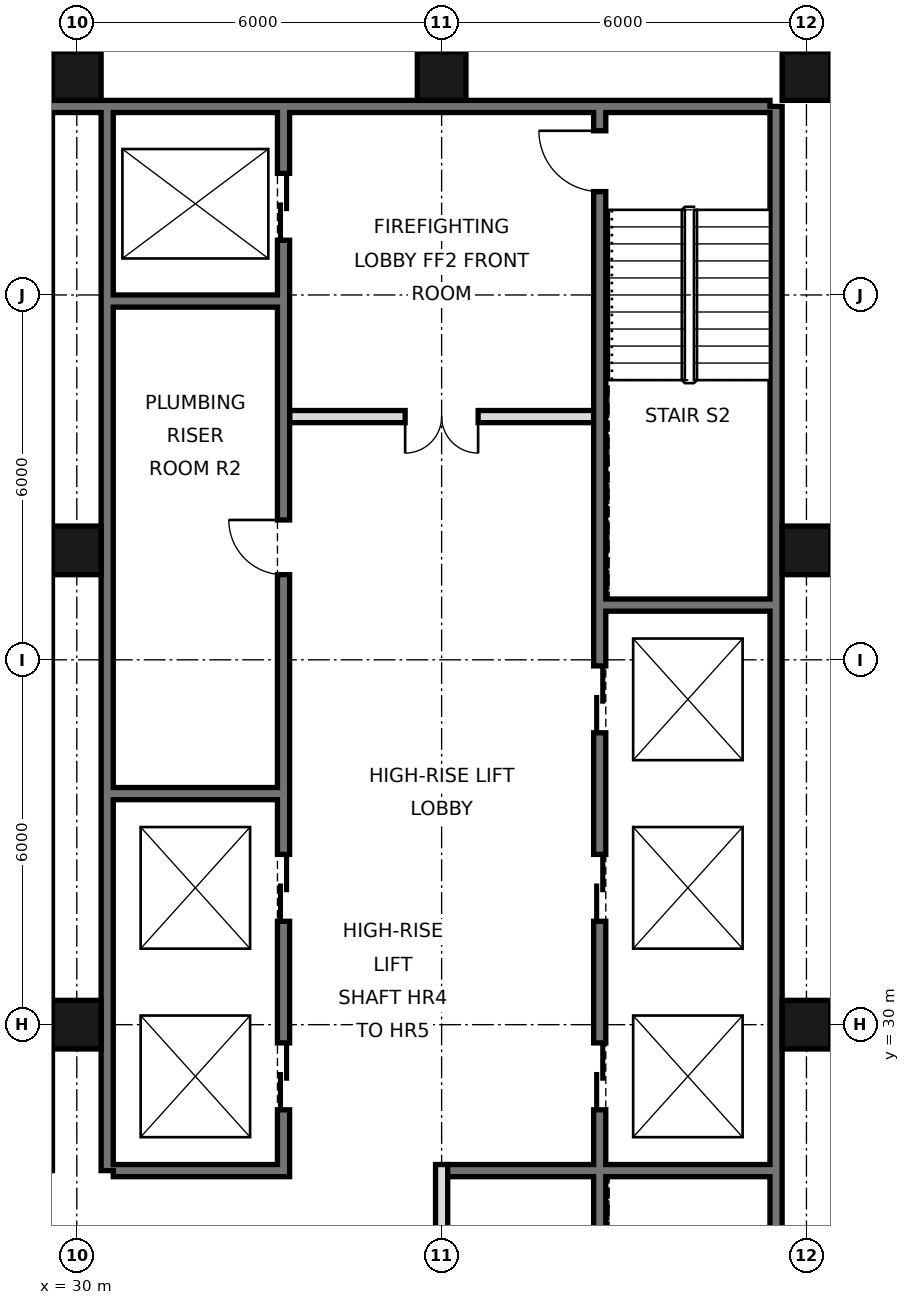
"""IFC4 building model, lengths in metres.
Left out: names, types, materials, properties, quantities, classifications, styles, units other than length and angle.
Written with IfcOpenShell. Run it as: python <this file> out.ifc"""

import sys

from ifc_helpers import new_model, si_unit, direction, frame, frame_2d, origin, origin_2d, place, context, subcontext, project, spatial, rectangle, hollow_rectangle, extrude, element, fill, save


model = new_model("IFC4")
c1 = context("Model", 3, precision=1e-05, world=origin(), true_north=direction((0.0, 1.0)))
c2 = subcontext(c1, "Body", "Model", "MODEL_VIEW")
j1 = project(units=[si_unit("LENGTHUNIT", "METRE"), si_unit("PLANEANGLEUNIT", "RADIAN")], contexts=[c1])
p1 = place(None, origin())
s1 = spatial("IfcSite", under=j1, at=p1, CompositionType="ELEMENT")
p2 = place(p1, origin())
s2 = spatial("IfcBuilding", under=s1, at=p2, CompositionType="ELEMENT")
p3 = place(p2, frame((0.0, 0.0, 316.0)))
s3 = spatial("IfcBuildingStorey", under=s2, at=p3, CompositionType="ELEMENT", Elevation=316.0)
for number, where, z_axis, x_axis in (
    (1, (30.0, 30.0, 0.0), (0.0, 0.0, 1.0), (1.0, 0.0, 0.0)),
    (2, (30.0, 37.8, 0.0), (0.0, 0.0, 1.0), (1.0, 0.0, 0.0)),
    (3, (30.0, 45.6, 0.0), (0.0, 0.0, 1.0), (1.0, 0.0, 0.0)),
    (4, (36.0, 45.6, 0.0), (0.0, 0.0, 1.0), (1.0, 0.0, 0.0)),
    (5, (42.0, 30.0, 0.0), (0.0, 0.0, 1.0), (1.0, 0.0, 0.0)),
    (6, (42.0, 37.8, 0.0), (0.0, 0.0, 1.0), (1.0, 0.0, 0.0)),
    (7, (42.0, 45.6, 0.0), (0.0, 0.0, 1.0), (1.0, 0.0, 0.0)),
):
    element("IfcColumn", number, at=place(p3, frame(where, z_axis=z_axis, x_axis=x_axis)), inside=s3, PredefinedType="COLUMN", context=c2, shape_type="SweptSolid", body=[
        extrude(hollow_rectangle(XDim=0.8, YDim=0.8, WallThickness=0.025, at=origin_2d()), origin(), (0.0, 0.0, 1.0), 3.6),
    ])
p4 = place(p3, frame((41.5, 21.6, 0.0), z_axis=(0.0, 0.0, 1.0), x_axis=(0.0, 1.0, 0.0)))
e8 = element("IfcWall", 8, at=p4, inside=s3, PredefinedType="SOLIDWALL", context=c2, shape_type="SweptSolid", body=[
    extrude(rectangle(XDim=23.5, YDim=0.2, at=frame_2d((11.75, 0.0))), origin(), (0.0, 0.0, 1.0), 3.42),
])
p5 = place(p3, frame((6.6, 45.1, 0.0), z_axis=(0.0, 0.0, 1.0), x_axis=(1.0, 0.0, 0.0)))
e9 = element("IfcWall", 9, at=p5, inside=s3, PredefinedType="SOLIDWALL", context=c2, shape_type="SweptSolid", body=[
    extrude(rectangle(XDim=34.8, YDim=0.2, at=frame_2d((17.4, 0.0))), origin(), (0.0, 0.0, 1.0), 3.42),
])
p6 = place(p3, frame((30.5, 27.6, 0.0), z_axis=(0.0, 0.0, 1.0), x_axis=(0.0, 1.0, 0.0)))
e10 = element("IfcWall", 10, at=p6, inside=s3, PredefinedType="SOLIDWALL", context=c2, shape_type="SweptSolid", body=[
    extrude(rectangle(XDim=17.5, YDim=0.2, at=frame_2d((8.75, 0.0))), origin(), (0.0, 0.0, 1.0), 3.42),
])
p7 = place(p3, frame((33.4, 27.5, 0.0), z_axis=(0.0, 0.0, 1.0), x_axis=(0.0, 1.0, 0.0)))
e11 = element("IfcWall", 11, at=p7, inside=s3, PredefinedType="SOLIDWALL", context=c2, shape_type="SweptSolid", body=[
    extrude(rectangle(XDim=17.5, YDim=0.2, at=frame_2d((8.75, 0.0))), origin(), (0.0, 0.0, 1.0), 3.42),
])
p8 = place(p7, frame((1.1, 0.0, 0.0)))
e12 = element("IfcOpeningElement", 12, at=p8, cuts=e11, PredefinedType="OPENING", context=c2, shape_type="SweptSolid", body=[
    extrude(rectangle(XDim=1.1, YDim=2.1, at=frame_2d((0.55, 1.05))), frame((0.0, 0.11, 0.0), z_axis=(0.0, -1.0, 0.0), x_axis=(1.0, 0.0, 0.0)), (0.0, 0.0, 1.0), 0.22),
])
p9 = place(p7, frame((4.2, 0.0, 0.0)))
e13 = element("IfcOpeningElement", 13, at=p9, cuts=e11, PredefinedType="OPENING", context=c2, shape_type="SweptSolid", body=[
    extrude(rectangle(XDim=1.1, YDim=2.1, at=frame_2d((0.55, 1.05))), frame((0.0, 0.11, 0.0), z_axis=(0.0, -1.0, 0.0), x_axis=(1.0, 0.0, 0.0)), (0.0, 0.0, 1.0), 0.22),
])
p10 = place(p7, frame((15.4, 0.0, 0.0)))
e14 = element("IfcOpeningElement", 14, at=p10, cuts=e11, PredefinedType="OPENING", context=c2, shape_type="SweptSolid", body=[
    extrude(rectangle(XDim=1.1, YDim=2.1, at=frame_2d((0.55, 1.05))), frame((0.0, 0.11, 0.0), z_axis=(0.0, -1.0, 0.0), x_axis=(1.0, 0.0, 0.0)), (0.0, 0.0, 1.0), 0.22),
])
p11 = place(p7, frame((9.9, 0.0, 0.0)))
e15 = element("IfcOpeningElement", 15, at=p11, cuts=e11, PredefinedType="OPENING", context=c2, shape_type="SweptSolid", body=[
    extrude(rectangle(XDim=0.9, YDim=2.1, at=frame_2d((0.45, 1.05))), frame((0.0, 0.11, 0.0), z_axis=(0.0, -1.0, 0.0), x_axis=(1.0, 0.0, 0.0)), (0.0, 0.0, 1.0), 0.22),
])
p12 = place(p3, frame((36.0, 21.6, 0.0), z_axis=(0.0, 0.0, 1.0), x_axis=(0.0, 1.0, 0.0)))
e16 = element("IfcWall", 16, at=p12, inside=s3, PredefinedType="PARTITIONING", context=c2, shape_type="SweptSolid", body=[
    extrude(rectangle(XDim=6.1, YDim=0.2, at=frame_2d((3.05, 0.0))), origin(), (0.0, 0.0, 1.0), 3.42),
])
p13 = place(p3, frame((38.6, 21.6, 0.0), z_axis=(0.0, 0.0, 1.0), x_axis=(0.0, 1.0, 0.0)))
e17 = element("IfcWall", 17, at=p13, inside=s3, PredefinedType="SOLIDWALL", context=c2, shape_type="SweptSolid", body=[
    extrude(rectangle(XDim=23.4, YDim=0.2, at=frame_2d((11.7, 0.0))), origin(), (0.0, 0.0, 1.0), 3.42),
])
p14 = place(p13, frame((7.0, 0.0, 0.0)))
e18 = element("IfcOpeningElement", 18, at=p14, cuts=e17, PredefinedType="OPENING", context=c2, shape_type="SweptSolid", body=[
    extrude(rectangle(XDim=1.1, YDim=2.1, at=frame_2d((0.55, 1.05))), frame((0.0, 0.11, 0.0), z_axis=(0.0, -1.0, 0.0), x_axis=(1.0, 0.0, 0.0)), (0.0, 0.0, 1.0), 0.22),
])
p15 = place(p13, frame((10.1, 0.0, 0.0)))
e19 = element("IfcOpeningElement", 19, at=p15, cuts=e17, PredefinedType="OPENING", context=c2, shape_type="SweptSolid", body=[
    extrude(rectangle(XDim=1.1, YDim=2.1, at=frame_2d((0.55, 1.05))), frame((0.0, 0.11, 0.0), z_axis=(0.0, -1.0, 0.0), x_axis=(1.0, 0.0, 0.0)), (0.0, 0.0, 1.0), 0.22),
])
p16 = place(p13, frame((13.2, 0.0, 0.0)))
e20 = element("IfcOpeningElement", 20, at=p16, cuts=e17, PredefinedType="OPENING", context=c2, shape_type="SweptSolid", body=[
    extrude(rectangle(XDim=1.1, YDim=2.1, at=frame_2d((0.55, 1.05))), frame((0.0, 0.11, 0.0), z_axis=(0.0, -1.0, 0.0), x_axis=(1.0, 0.0, 0.0)), (0.0, 0.0, 1.0), 0.22),
])
p17 = place(p13, frame((22.1, 0.0, 0.0)))
e21 = element("IfcOpeningElement", 21, at=p17, cuts=e17, PredefinedType="OPENING", context=c2, shape_type="SweptSolid", body=[
    extrude(rectangle(XDim=1.0, YDim=2.1, at=frame_2d((0.5, 1.05))), frame((0.0, 0.11, 0.0), z_axis=(0.0, -1.0, 0.0), x_axis=(1.0, 0.0, 0.0)), (0.0, 0.0, 1.0), 0.22),
])
p18 = place(p13, frame((0.175, 0.0, 0.0)))
e22 = element("IfcOpeningElement", 22, at=p18, cuts=e17, PredefinedType="OPENING", context=c2, shape_type="SweptSolid", body=[
    extrude(rectangle(XDim=0.9, YDim=2.1, at=frame_2d((0.45, 1.05))), frame((0.0, 0.11, 0.0), z_axis=(0.0, -1.0, 0.0), x_axis=(1.0, 0.0, 0.0)), (0.0, 0.0, 1.0), 0.22),
])
p19 = place(p3, frame((30.6, 27.6, 0.0), z_axis=(0.0, 0.0, 1.0), x_axis=(1.0, 0.0, 0.0)))
e23 = element("IfcWall", 23, at=p19, inside=s3, PredefinedType="SOLIDWALL", context=c2, shape_type="SweptSolid", body=[
    extrude(rectangle(XDim=2.7, YDim=0.2, at=frame_2d((1.35, 0.0))), origin(), (0.0, 0.0, 1.0), 3.42),
])
p20 = place(p3, frame((36.1, 27.6, 0.0), z_axis=(0.0, 0.0, 1.0), x_axis=(1.0, 0.0, 0.0)))
e24 = element("IfcWall", 24, at=p20, inside=s3, PredefinedType="SOLIDWALL", context=c2, shape_type="SweptSolid", body=[
    extrude(rectangle(XDim=5.3, YDim=0.2, at=frame_2d((2.65, 0.0))), origin(), (0.0, 0.0, 1.0), 3.42),
])
for number, where, z_axis, x_axis in (
    (25, (30.6, 33.8, 0.0), (0.0, 0.0, 1.0), (1.0, 0.0, 0.0)),
    (26, (38.7, 36.9, 0.0), (0.0, 0.0, 1.0), (1.0, 0.0, 0.0)),
):
    element("IfcWall", number, at=place(p3, frame(where, z_axis=z_axis, x_axis=x_axis)), inside=s3, PredefinedType="SOLIDWALL", context=c2, shape_type="SweptSolid", body=[
        extrude(rectangle(XDim=2.7, YDim=0.2, at=frame_2d((1.35, 0.0))), origin(), (0.0, 0.0, 1.0), 3.42),
    ])
p21 = place(p3, frame((33.5, 40.0, 0.0), z_axis=(0.0, 0.0, 1.0), x_axis=(1.0, 0.0, 0.0)))
e27 = element("IfcWall", 27, at=p21, inside=s3, PredefinedType="PARTITIONING", context=c2, shape_type="SweptSolid", body=[
    extrude(rectangle(XDim=5.0, YDim=0.2, at=frame_2d((2.5, 0.0))), origin(), (0.0, 0.0, 1.0), 3.42),
])
p22 = place(p21, frame((1.9, 0.0, 0.0)))
e28 = element("IfcOpeningElement", 28, at=p22, cuts=e27, PredefinedType="OPENING", context=c2, shape_type="SweptSolid", body=[
    extrude(rectangle(XDim=1.2, YDim=2.1, at=frame_2d((0.6, 1.05))), frame((0.0, 0.11, 0.0), z_axis=(0.0, -1.0, 0.0), x_axis=(1.0, 0.0, 0.0)), (0.0, 0.0, 1.0), 0.22),
])
p23 = place(p3, frame((30.6, 41.9, 0.0), z_axis=(0.0, 0.0, 1.0), x_axis=(1.0, 0.0, 0.0)))
e29 = element("IfcWall", 29, at=p23, inside=s3, PredefinedType="SOLIDWALL", context=c2, shape_type="SweptSolid", body=[
    extrude(rectangle(XDim=2.7, YDim=0.2, at=frame_2d((1.35, 0.0))), origin(), (0.0, 0.0, 1.0), 3.42),
])
p24 = place(p22, frame((1.2, 0.0, 0.0), z_axis=(0.0, 0.0, 1.0), x_axis=(-1.0, 0.0, 0.0)))
e30 = element("IfcDoor", 30, at=p24, inside=s3, OperationType="DOUBLE_DOOR_SINGLE_SWING", PredefinedType="DOOR", context=c2, shape_type="SweptSolid", body=[
    extrude(rectangle(XDim=1.2, YDim=2.1, at=frame_2d((0.6, 1.05))), frame((0.0, 0.025, 0.0), z_axis=(0.0, -1.0, 0.0), x_axis=(1.0, 0.0, 0.0)), (0.0, 0.0, 1.0), 0.05),
])
fill(e28, e30)
p25 = place(p14, origin())
e31 = element("IfcDoor", 31, at=p25, inside=s3, OperationType="DOUBLE_DOOR_SLIDING", PredefinedType="DOOR", context=c2, shape_type="SweptSolid", body=[
    extrude(rectangle(XDim=1.1, YDim=2.1, at=frame_2d((0.55, 1.05))), frame((0.0, 0.025, 0.0), z_axis=(0.0, -1.0, 0.0), x_axis=(1.0, 0.0, 0.0)), (0.0, 0.0, 1.0), 0.05),
])
fill(e18, e31)
p26 = place(p15, origin())
e32 = element("IfcDoor", 32, at=p26, inside=s3, OperationType="DOUBLE_DOOR_SLIDING", PredefinedType="DOOR", context=c2, shape_type="SweptSolid", body=[
    extrude(rectangle(XDim=1.1, YDim=2.1, at=frame_2d((0.55, 1.05))), frame((0.0, 0.025, 0.0), z_axis=(0.0, -1.0, 0.0), x_axis=(1.0, 0.0, 0.0)), (0.0, 0.0, 1.0), 0.05),
])
fill(e19, e32)
p27 = place(p16, origin())
e33 = element("IfcDoor", 33, at=p27, inside=s3, OperationType="DOUBLE_DOOR_SLIDING", PredefinedType="DOOR", context=c2, shape_type="SweptSolid", body=[
    extrude(rectangle(XDim=1.1, YDim=2.1, at=frame_2d((0.55, 1.05))), frame((0.0, 0.025, 0.0), z_axis=(0.0, -1.0, 0.0), x_axis=(1.0, 0.0, 0.0)), (0.0, 0.0, 1.0), 0.05),
])
fill(e20, e33)
p28 = place(p8, origin())
e34 = element("IfcDoor", 34, at=p28, inside=s3, OperationType="DOUBLE_DOOR_SLIDING", PredefinedType="DOOR", context=c2, shape_type="SweptSolid", body=[
    extrude(rectangle(XDim=1.1, YDim=2.1, at=frame_2d((0.55, 1.05))), frame((0.0, 0.025, 0.0), z_axis=(0.0, -1.0, 0.0), x_axis=(1.0, 0.0, 0.0)), (0.0, 0.0, 1.0), 0.05),
])
fill(e12, e34)
p29 = place(p9, origin())
e35 = element("IfcDoor", 35, at=p29, inside=s3, OperationType="DOUBLE_DOOR_SLIDING", PredefinedType="DOOR", context=c2, shape_type="SweptSolid", body=[
    extrude(rectangle(XDim=1.1, YDim=2.1, at=frame_2d((0.55, 1.05))), frame((0.0, 0.025, 0.0), z_axis=(0.0, -1.0, 0.0), x_axis=(1.0, 0.0, 0.0)), (0.0, 0.0, 1.0), 0.05),
])
fill(e13, e35)
p30 = place(p10, origin())
e36 = element("IfcDoor", 36, at=p30, inside=s3, OperationType="DOUBLE_DOOR_SLIDING", PredefinedType="DOOR", context=c2, shape_type="SweptSolid", body=[
    extrude(rectangle(XDim=1.1, YDim=2.1, at=frame_2d((0.55, 1.05))), frame((0.0, 0.025, 0.0), z_axis=(0.0, -1.0, 0.0), x_axis=(1.0, 0.0, 0.0)), (0.0, 0.0, 1.0), 0.05),
])
fill(e14, e36)
p31 = place(p17, frame((1.0, 0.0, 0.0), z_axis=(0.0, 0.0, 1.0), x_axis=(-1.0, 0.0, 0.0)))
e37 = element("IfcDoor", 37, at=p31, inside=s3, OperationType="SINGLE_SWING_LEFT", PredefinedType="DOOR", context=c2, shape_type="SweptSolid", body=[
    extrude(rectangle(XDim=1.0, YDim=2.1, at=frame_2d((0.5, 1.05))), frame((0.0, 0.025, 0.0), z_axis=(0.0, -1.0, 0.0), x_axis=(1.0, 0.0, 0.0)), (0.0, 0.0, 1.0), 0.05),
])
fill(e21, e37)
p32 = place(p11, frame((0.9, 0.0, 0.0), z_axis=(0.0, 0.0, 1.0), x_axis=(-1.0, 0.0, 0.0)))
e38 = element("IfcDoor", 38, at=p32, inside=s3, OperationType="SINGLE_SWING_LEFT", PredefinedType="DOOR", context=c2, shape_type="SweptSolid", body=[
    extrude(rectangle(XDim=0.9, YDim=2.1, at=frame_2d((0.45, 1.05))), frame((0.0, 0.025, 0.0), z_axis=(0.0, -1.0, 0.0), x_axis=(1.0, 0.0, 0.0)), (0.0, 0.0, 1.0), 0.05),
])
fill(e15, e38)
save(model, sys.argv[1])
